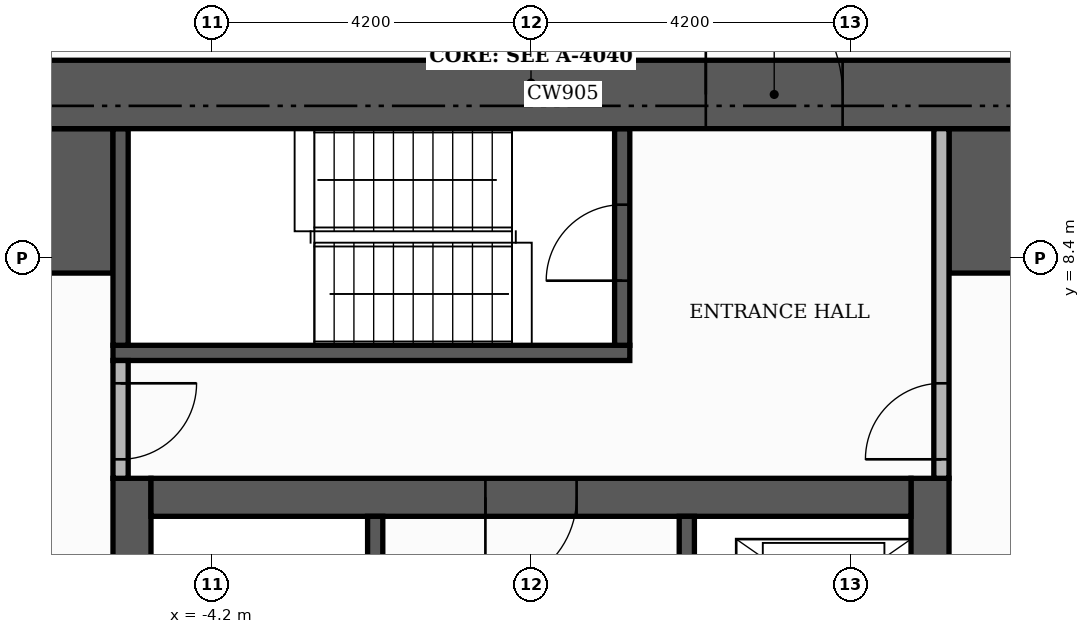
"""IFC4 building model, lengths in metres.
Left out: names, types, materials, properties, quantities, classifications, styles, units other than length and angle.
Written with IfcOpenShell. Run it as: python <this file> out.ifc"""

import sys

from ifc_helpers import new_model, si_unit, direction, frame, frame_2d, origin, place, context, subcontext, project, spatial, rectangle, extrude, element, fill, save


model = new_model("IFC4")
c1 = context("Model", 3, precision=1e-05, world=origin(), true_north=direction((0.0, 1.0)))
c2 = subcontext(c1, "Body", "Model", "MODEL_VIEW")
j1 = project(units=[si_unit("LENGTHUNIT", "METRE"), si_unit("PLANEANGLEUNIT", "RADIAN")], contexts=[c1])
p1 = place(None, origin())
s1 = spatial("IfcSite", under=j1, at=p1, CompositionType="ELEMENT")
p2 = place(p1, origin())
s2 = spatial("IfcBuilding", under=s1, at=p2, CompositionType="ELEMENT")
p3 = place(p2, frame((0.0, 0.0, 248.4)))
s3 = spatial("IfcBuildingStorey", under=s2, at=p3, CompositionType="ELEMENT", Elevation=248.4)
for number, where, z_axis, x_axis in (
    (1, (-5.25, -5.0, 0.0), (0.0, 0.0, 1.0), (0.0, 1.0, 0.0)),
    (2, (5.25, -5.0, 0.0), (0.0, 0.0, 1.0), (0.0, 1.0, 0.0)),
):
    element("IfcWall", number, at=place(p3, frame(where, z_axis=z_axis, x_axis=x_axis)), inside=s3, PredefinedType="SHEAR", context=c2, shape_type="SweptSolid", body=[
        extrude(rectangle(XDim=10.5, YDim=0.5, at=frame_2d((5.25, 0.0))), origin(), (0.0, 0.0, 1.0), 3.48),
    ])
p4 = place(p3, frame((-5.0, 5.25, 0.0), z_axis=(0.0, 0.0, 1.0), x_axis=(1.0, 0.0, 0.0)))
e3 = element("IfcWall", 3, at=p4, inside=s3, PredefinedType="SHEAR", context=c2, shape_type="SweptSolid", body=[
    extrude(rectangle(XDim=10.0, YDim=0.5, at=frame_2d((5.0, 0.0))), origin(), (0.0, 0.0, 1.0), 3.48),
])
p5 = place(p4, frame((4.4, 0.0, 0.0)))
e4 = element("IfcOpeningElement", 4, at=p5, cuts=e3, PredefinedType="OPENING", context=c2, shape_type="SweptSolid", body=[
    extrude(rectangle(XDim=1.2, YDim=2.1, at=frame_2d((0.6, 1.05))), frame((0.0, 0.26, 0.0), z_axis=(0.0, -1.0, 0.0), x_axis=(1.0, 0.0, 0.0)), (0.0, 0.0, 1.0), 0.52),
])
for number, where, z_axis, x_axis in (
    (5, (-10.1, 9.15, 0.0), (0.0, 0.0, 1.0), (1.0, 0.0, 0.0)),
    (6, (5.5, 9.15, 0.0), (0.0, 0.0, 1.0), (1.0, 0.0, 0.0)),
):
    element("IfcWall", number, at=place(p3, frame(where, z_axis=z_axis, x_axis=x_axis)), inside=s3, PredefinedType="SHEAR", context=c2, shape_type="SweptSolid", body=[
        extrude(rectangle(XDim=4.6, YDim=1.9, at=frame_2d((2.3, 0.0))), origin(), (0.0, 0.0, 1.0), 3.48),
    ])
p6 = place(p3, frame((-2.05, -1.4, 0.0), z_axis=(0.0, 0.0, 1.0), x_axis=(0.0, 1.0, 0.0)))
e7 = element("IfcWall", 7, at=p6, inside=s3, PredefinedType="SHEAR", context=c2, shape_type="SweptSolid", body=[
    extrude(rectangle(XDim=6.4, YDim=0.2, at=frame_2d((3.2, 0.0))), origin(), (0.0, 0.0, 1.0), 3.48),
])
p7 = place(p6, frame((0.15, 0.0, 0.0)))
e8 = element("IfcOpeningElement", 8, at=p7, cuts=e7, PredefinedType="OPENING", context=c2, shape_type="SweptSolid", body=[
    extrude(rectangle(XDim=1.0, YDim=2.1, at=frame_2d((0.5, 1.05))), frame((0.0, 0.11, 0.0), z_axis=(0.0, -1.0, 0.0), x_axis=(1.0, 0.0, 0.0)), (0.0, 0.0, 1.0), 0.22),
])
p8 = place(p3, frame((-5.5, 7.15, 0.0), z_axis=(0.0, 0.0, 1.0), x_axis=(1.0, 0.0, 0.0)))
e9 = element("IfcWall", 9, at=p8, inside=s3, PredefinedType="SHEAR", context=c2, shape_type="SweptSolid", body=[
    extrude(rectangle(XDim=6.8, YDim=0.2, at=frame_2d((3.4, 0.0))), origin(), (0.0, 0.0, 1.0), 3.48),
])
p9 = place(p3, frame((-5.4, 7.25, 0.0), z_axis=(0.0, 0.0, 1.0), x_axis=(0.0, 1.0, 0.0)))
e10 = element("IfcWall", 10, at=p9, inside=s3, PredefinedType="SHEAR", context=c2, shape_type="SweptSolid", body=[
    extrude(rectangle(XDim=2.85, YDim=0.2, at=frame_2d((1.425, 0.0))), origin(), (0.0, 0.0, 1.0), 3.48),
])
p10 = place(p3, frame((1.2, 7.25, 0.0), z_axis=(0.0, 0.0, 1.0), x_axis=(0.0, 1.0, 0.0)))
e11 = element("IfcWall", 11, at=p10, inside=s3, PredefinedType="SHEAR", context=c2, shape_type="SweptSolid", body=[
    extrude(rectangle(XDim=2.85, YDim=0.2, at=frame_2d((1.425, 0.0))), origin(), (0.0, 0.0, 1.0), 3.48),
])
p11 = place(p10, frame((0.85, 0.0, 0.0)))
e12 = element("IfcOpeningElement", 12, at=p11, cuts=e11, PredefinedType="OPENING", context=c2, shape_type="SweptSolid", body=[
    extrude(rectangle(XDim=1.0, YDim=2.1, at=frame_2d((0.5, 1.05))), frame((0.0, 0.11, 0.0), z_axis=(0.0, -1.0, 0.0), x_axis=(1.0, 0.0, 0.0)), (0.0, 0.0, 1.0), 0.22),
])
p12 = place(p3, frame((2.05, 1.6, 0.0), z_axis=(0.0, 0.0, 1.0), x_axis=(0.0, 1.0, 0.0)))
e13 = element("IfcWall", 13, at=p12, inside=s3, PredefinedType="SHEAR", context=c2, shape_type="SweptSolid", body=[
    extrude(rectangle(XDim=3.4, YDim=0.2, at=frame_2d((1.7, 0.0))), origin(), (0.0, 0.0, 1.0), 3.48),
])
p13 = place(p12, frame((1.75, 0.0, 0.0)))
e14 = element("IfcOpeningElement", 14, at=p13, cuts=e13, PredefinedType="OPENING", context=c2, shape_type="SweptSolid", body=[
    extrude(rectangle(XDim=1.1, YDim=2.1, at=frame_2d((0.55, 1.05))), frame((0.0, 0.11, 0.0), z_axis=(0.0, -1.0, 0.0), x_axis=(1.0, 0.0, 0.0)), (0.0, 0.0, 1.0), 0.22),
])
p14 = place(p12, frame((0.15, 0.0, 0.0)))
e15 = element("IfcOpeningElement", 15, at=p14, cuts=e13, PredefinedType="OPENING", context=c2, shape_type="SweptSolid", body=[
    extrude(rectangle(XDim=0.8, YDim=2.1, at=frame_2d((0.4, 1.05))), frame((0.0, 0.11, 0.0), z_axis=(0.0, -1.0, 0.0), x_axis=(1.0, 0.0, 0.0)), (0.0, 0.0, 1.0), 0.22),
])
p15 = place(p3, frame((-11.0, 10.55, 0.0), z_axis=(0.0, 0.0, 1.0), x_axis=(1.0, 0.0, 0.0)))
e16 = element("IfcWall", 16, at=p15, inside=s3, PredefinedType="SHEAR", context=c2, shape_type="SweptSolid", body=[
    extrude(rectangle(XDim=22.0, YDim=0.9, at=frame_2d((11.0, 0.0))), origin(), (0.0, 0.0, 1.0), 3.48),
])
p16 = place(p15, frame((13.3, 0.0, 0.0)))
e17 = element("IfcOpeningElement", 17, at=p16, cuts=e16, PredefinedType="OPENING", context=c2, shape_type="SweptSolid", body=[
    extrude(rectangle(XDim=1.8, YDim=2.2, at=frame_2d((0.9, 1.1))), frame((0.0, 0.46, 0.0), z_axis=(0.0, -1.0, 0.0), x_axis=(1.0, 0.0, 0.0)), (0.0, 0.0, 1.0), 0.92),
])
p17 = place(p3, frame((-5.4, 5.5, 0.0), z_axis=(0.0, 0.0, 1.0), x_axis=(0.0, 1.0, 0.0)))
e18 = element("IfcWall", 18, at=p17, inside=s3, PredefinedType="PARTITIONING", context=c2, shape_type="SweptSolid", body=[
    extrude(rectangle(XDim=1.55, YDim=0.2, at=frame_2d((0.775, 0.0))), origin(), (0.0, 0.0, 1.0), 3.48),
])
p18 = place(p17, frame((0.25, 0.0, 0.0)))
e19 = element("IfcOpeningElement", 19, at=p18, cuts=e18, PredefinedType="OPENING", context=c2, shape_type="SweptSolid", body=[
    extrude(rectangle(XDim=1.0, YDim=2.1, at=frame_2d((0.5, 1.05))), frame((0.0, 0.11, 0.0), z_axis=(0.0, -1.0, 0.0), x_axis=(1.0, 0.0, 0.0)), (0.0, 0.0, 1.0), 0.22),
])
p19 = place(p3, frame((5.4, 5.5, 0.0), z_axis=(0.0, 0.0, 1.0), x_axis=(0.0, 1.0, 0.0)))
e20 = element("IfcWall", 20, at=p19, inside=s3, PredefinedType="PARTITIONING", context=c2, shape_type="SweptSolid", body=[
    extrude(rectangle(XDim=4.6, YDim=0.2, at=frame_2d((2.3, 0.0))), origin(), (0.0, 0.0, 1.0), 3.48),
])
p20 = place(p19, frame((0.25, 0.0, 0.0)))
e21 = element("IfcOpeningElement", 21, at=p20, cuts=e20, PredefinedType="OPENING", context=c2, shape_type="SweptSolid", body=[
    extrude(rectangle(XDim=1.0, YDim=2.1, at=frame_2d((0.5, 1.05))), frame((0.0, 0.11, 0.0), z_axis=(0.0, -1.0, 0.0), x_axis=(1.0, 0.0, 0.0)), (0.0, 0.0, 1.0), 0.22),
])
p21 = place(p5, frame((1.2, 0.0, 0.0), z_axis=(0.0, 0.0, 1.0), x_axis=(-1.0, 0.0, 0.0)))
e22 = element("IfcDoor", 22, at=p21, inside=s3, OperationType="SINGLE_SWING_LEFT", PredefinedType="DOOR", context=c2, shape_type="SweptSolid", body=[
    extrude(rectangle(XDim=1.2, YDim=2.1, at=frame_2d((0.6, 1.05))), frame((0.0, 0.025, 0.0), z_axis=(0.0, -1.0, 0.0), x_axis=(1.0, 0.0, 0.0)), (0.0, 0.0, 1.0), 0.05),
])
fill(e4, e22)
p22 = place(p11, origin())
e23 = element("IfcDoor", 23, at=p22, inside=s3, OperationType="SINGLE_SWING_LEFT", PredefinedType="DOOR", context=c2, shape_type="SweptSolid", body=[
    extrude(rectangle(XDim=1.0, YDim=2.1, at=frame_2d((0.5, 1.05))), frame((0.0, 0.025, 0.0), z_axis=(0.0, -1.0, 0.0), x_axis=(1.0, 0.0, 0.0)), (0.0, 0.0, 1.0), 0.05),
])
fill(e12, e23)
p23 = place(p18, frame((1.0, 0.0, 0.0), z_axis=(0.0, 0.0, 1.0), x_axis=(-1.0, 0.0, 0.0)))
e24 = element("IfcDoor", 24, at=p23, inside=s3, OperationType="SINGLE_SWING_RIGHT", PredefinedType="DOOR", context=c2, shape_type="SweptSolid", body=[
    extrude(rectangle(XDim=1.0, YDim=2.1, at=frame_2d((0.5, 1.05))), frame((0.0, 0.025, 0.0), z_axis=(0.0, -1.0, 0.0), x_axis=(1.0, 0.0, 0.0)), (0.0, 0.0, 1.0), 0.05),
])
fill(e19, e24)
p24 = place(p20, origin())
e25 = element("IfcDoor", 25, at=p24, inside=s3, OperationType="SINGLE_SWING_LEFT", PredefinedType="DOOR", context=c2, shape_type="SweptSolid", body=[
    extrude(rectangle(XDim=1.0, YDim=2.1, at=frame_2d((0.5, 1.05))), frame((0.0, 0.025, 0.0), z_axis=(0.0, -1.0, 0.0), x_axis=(1.0, 0.0, 0.0)), (0.0, 0.0, 1.0), 0.05),
])
fill(e21, e25)
p25 = place(p16, origin())
e26 = element("IfcDoor", 26, at=p25, inside=s3, OperationType="DOUBLE_DOOR_SINGLE_SWING", PredefinedType="DOOR", context=c2, shape_type="SweptSolid", body=[
    extrude(rectangle(XDim=1.8, YDim=2.2, at=frame_2d((0.9, 1.1))), frame((0.0, 0.025, 0.0), z_axis=(0.0, -1.0, 0.0), x_axis=(1.0, 0.0, 0.0)), (0.0, 0.0, 1.0), 0.05),
])
fill(e17, e26)
save(model, sys.argv[1])
